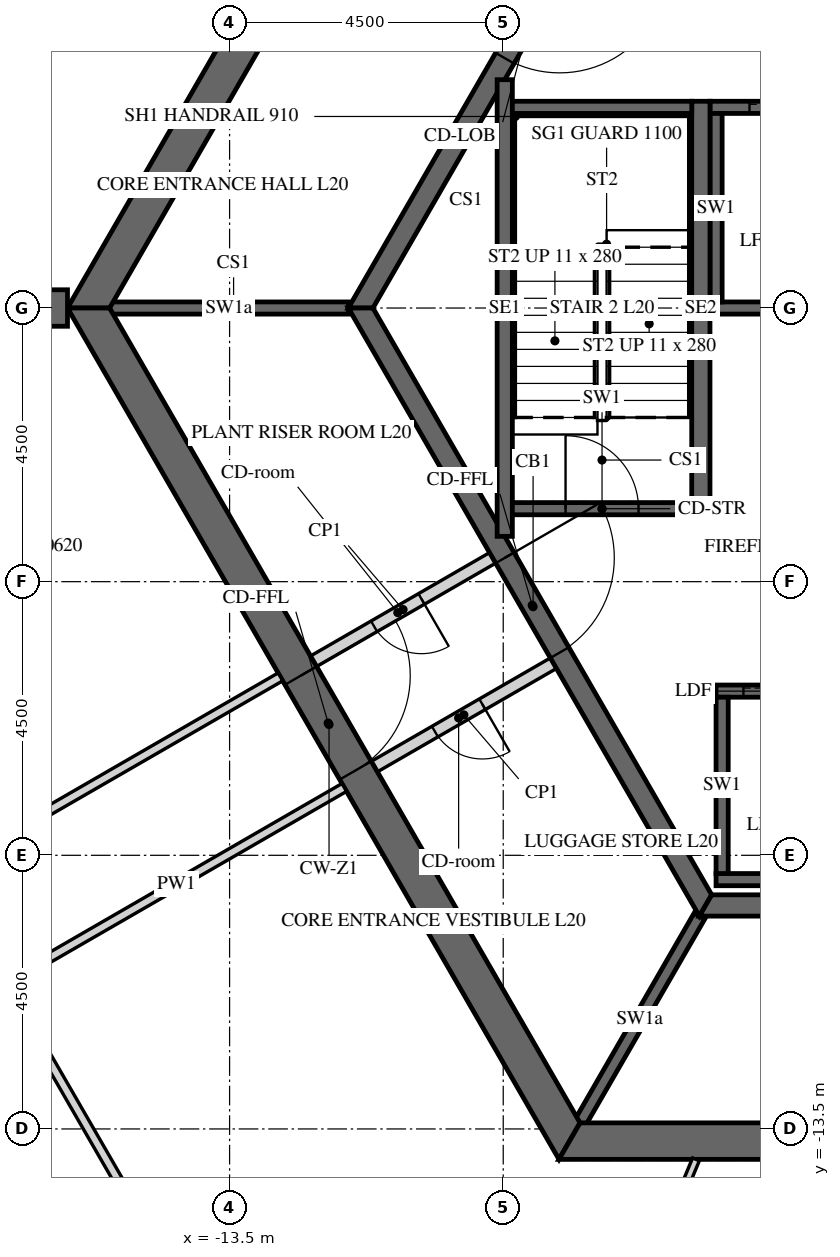
"""IFC4 building model, lengths in metres.
Left out: names, types, materials, properties, quantities, classifications, styles, units other than length and angle.
Written with IfcOpenShell. Run it as: python <this file> out.ifc"""

import sys

from ifc_helpers import new_model, si_unit, direction, frame, frame_2d, origin, place, context, subcontext, project, spatial, polyline, rectangle, outline, extrude, element, fill, save


model = new_model("IFC4")
c1 = context("Model", 3, precision=1e-05, world=origin(), true_north=direction((0.0, 1.0)))
c2 = subcontext(c1, "Body", "Model", "MODEL_VIEW")
j1 = project(units=[si_unit("LENGTHUNIT", "METRE"), si_unit("PLANEANGLEUNIT", "RADIAN")], contexts=[c1])
p1 = place(None, origin())
s1 = spatial("IfcSite", under=j1, at=p1, CompositionType="ELEMENT")
p2 = place(p1, origin())
s2 = spatial("IfcBuilding", under=s1, at=p2, CompositionType="ELEMENT")
p3 = place(p2, frame((0.0, 0.0, 92.1)))
s3 = spatial("IfcBuildingStorey", under=s2, at=p3, CompositionType="ELEMENT", Elevation=92.1)
p4 = place(p3, frame((-7.91, 13.7, -0.15), z_axis=(0.0, 0.0, 1.0), x_axis=(-0.499999880136, -0.866025472988, 0.0)))
e1 = element("IfcWall", 1, at=p4, inside=s3, PredefinedType="SHEAR", context=c2, shape_type="SweptSolid", body=[
    extrude(outline(polyline([(-0.173, -0.3), (15.993, -0.3), (15.646, 0.3), (0.173, 0.3), (-0.173, -0.3)])), origin(), (0.0, 0.0, 1.0), 3.9),
])
p5 = place(p4, frame((7.039, 0.0, 0.15)))
e2 = element("IfcOpeningElement", 2, at=p5, cuts=e1, PredefinedType="OPENING", context=c2, shape_type="SweptSolid", body=[
    extrude(rectangle(XDim=1.8, YDim=2.4, at=frame_2d((0.9, 1.2))), frame((0.0, 0.31, 0.0), z_axis=(0.0, -1.0, 0.0), x_axis=(1.0, 0.0, 0.0)), (0.0, 0.0, 1.0), 0.62),
])
p6 = place(p3, frame((-15.819, 0.0, -0.15), z_axis=(0.0, 0.0, 1.0), x_axis=(0.499999880136, -0.866025472988, 0.0)))
e3 = element("IfcWall", 3, at=p6, inside=s3, PredefinedType="SHEAR", context=c2, shape_type="SweptSolid", body=[
    extrude(outline(polyline([(-0.173, -0.3), (15.993, -0.3), (15.646, 0.3), (0.173, 0.3), (-0.173, -0.3)])), origin(), (0.0, 0.0, 1.0), 3.9),
])
p7 = place(p6, frame((6.981, 0.0, 0.15)))
e4 = element("IfcOpeningElement", 4, at=p7, cuts=e3, PredefinedType="OPENING", context=c2, shape_type="SweptSolid", body=[
    extrude(rectangle(XDim=1.8, YDim=2.4, at=frame_2d((0.9, 1.2))), frame((0.0, 0.31, 0.0), z_axis=(0.0, -1.0, 0.0), x_axis=(1.0, 0.0, 0.0)), (0.0, 0.0, 1.0), 0.62),
])
p8 = place(p3, frame((-7.91, -13.7, -0.15), z_axis=(0.0, 0.0, 1.0), x_axis=(1.0, 0.0, 0.0)))
e5 = element("IfcWall", 5, at=p8, inside=s3, PredefinedType="SHEAR", context=c2, shape_type="SweptSolid", body=[
    extrude(outline(polyline([(-0.173, -0.3), (15.993, -0.3), (15.646, 0.3), (0.173, 0.3), (-0.173, -0.3)])), origin(), (0.0, 0.0, 1.0), 3.9),
])
p9 = place(p8, frame((7.31, 0.0, 0.15)))
e6 = element("IfcOpeningElement", 6, at=p9, cuts=e5, PredefinedType="OPENING", context=c2, shape_type="SweptSolid", body=[
    extrude(rectangle(XDim=1.2, YDim=2.4, at=frame_2d((0.6, 1.2))), frame((0.0, 0.31, 0.0), z_axis=(0.0, -1.0, 0.0), x_axis=(1.0, 0.0, 0.0)), (0.0, 0.0, 1.0), 0.62),
])
p10 = place(p3, frame((-16.166, 0.0, -0.15), z_axis=(0.0, 0.0, 1.0), x_axis=(-1.0, 0.0, 0.0)))
e7 = element("IfcWall", 7, at=p10, inside=s3, PredefinedType="SHEAR", context=c2, shape_type="SweptSolid", body=[
    extrude(rectangle(XDim=16.509, YDim=0.6, at=frame_2d((8.254, 0.0))), origin(), (0.0, 0.0, 1.0), 3.9),
])
p11 = place(p10, frame((7.354, 0.0, 0.15)))
e8 = element("IfcOpeningElement", 8, at=p11, cuts=e7, PredefinedType="OPENING", context=c2, shape_type="SweptSolid", body=[
    extrude(rectangle(XDim=1.8, YDim=2.4, at=frame_2d((0.9, 1.2))), frame((0.0, 0.31, 0.0), z_axis=(0.0, -1.0, 0.0), x_axis=(1.0, 0.0, 0.0)), (0.0, 0.0, 1.0), 0.62),
])
p12 = place(p3, frame((-5.673, 9.825, -0.15), z_axis=(0.0, 0.0, 1.0), x_axis=(-0.499995046907, -0.866028263435, 0.0)))
e9 = element("IfcWall", 9, at=p12, inside=s3, PredefinedType="SHEAR", context=c2, shape_type="SweptSolid", body=[
    extrude(outline(polyline([(-0.101, -0.175), (11.446, -0.175), (11.244, 0.175), (0.101, 0.175), (-0.101, -0.175)])), origin(), (0.0, 0.0, 1.0), 3.9),
])
p13 = place(p12, frame((4.801, 0.0, 0.15)))
e10 = element("IfcOpeningElement", 10, at=p13, cuts=e9, PredefinedType="OPENING", context=c2, shape_type="SweptSolid", body=[
    extrude(rectangle(XDim=1.8, YDim=2.4, at=frame_2d((0.9, 1.2))), frame((0.0, 0.185, 0.0), z_axis=(0.0, -1.0, 0.0), x_axis=(1.0, 0.0, 0.0)), (0.0, 0.0, 1.0), 0.37),
])
p14 = place(p3, frame((-11.345, 0.0, -0.15), z_axis=(0.0, 0.0, 1.0), x_axis=(0.499995046907, -0.866028263435, 0.0)))
e11 = element("IfcWall", 11, at=p14, inside=s3, PredefinedType="SHEAR", context=c2, shape_type="SweptSolid", body=[
    extrude(outline(polyline([(-0.101, -0.175), (11.446, -0.175), (11.244, 0.175), (0.101, 0.175), (-0.101, -0.175)])), origin(), (0.0, 0.0, 1.0), 3.9),
])
p15 = place(p14, frame((4.744, 0.0, 0.15)))
e12 = element("IfcOpeningElement", 12, at=p15, cuts=e11, PredefinedType="OPENING", context=c2, shape_type="SweptSolid", body=[
    extrude(rectangle(XDim=1.8, YDim=2.4, at=frame_2d((0.9, 1.2))), frame((0.0, 0.185, 0.0), z_axis=(0.0, -1.0, 0.0), x_axis=(1.0, 0.0, 0.0)), (0.0, 0.0, 1.0), 0.37),
])
p16 = place(p3, frame((-5.673, -9.825, -0.15), z_axis=(0.0, 0.0, 1.0), x_axis=(1.0, 0.0, 0.0)))
e13 = element("IfcWall", 13, at=p16, inside=s3, PredefinedType="SHEAR", context=c2, shape_type="SweptSolid", body=[
    extrude(outline(polyline([(-0.101, -0.175), (11.446, -0.175), (11.244, 0.175), (0.101, 0.175), (-0.101, -0.175)])), origin(), (0.0, 0.0, 1.0), 3.9),
])
p17 = place(p3, frame((-5.6, 3.3, -0.25), z_axis=(0.0, 0.0, 1.0), x_axis=(1.0, 0.0, 0.0)))
e14 = element("IfcWall", 14, at=p17, inside=s3, PredefinedType="SHEAR", context=c2, shape_type="SweptSolid", body=[
    extrude(rectangle(XDim=11.2, YDim=0.2, at=frame_2d((5.6, 0.0))), origin(), (0.0, 0.0, 1.0), 3.9),
])
p18 = place(p17, frame((0.65, 0.0, 0.25)))
e15 = element("IfcOpeningElement", 15, at=p18, cuts=e14, PredefinedType="OPENING", context=c2, shape_type="SweptSolid", body=[
    extrude(rectangle(XDim=1.1, YDim=2.1, at=frame_2d((0.55, 1.05))), frame((0.0, 0.11, 0.0), z_axis=(0.0, -1.0, 0.0), x_axis=(1.0, 0.0, 0.0)), (0.0, 0.0, 1.0), 0.22),
])
p19 = place(p17, frame((2.85, 0.0, 0.25)))
e16 = element("IfcOpeningElement", 16, at=p19, cuts=e14, PredefinedType="OPENING", context=c2, shape_type="SweptSolid", body=[
    extrude(rectangle(XDim=1.1, YDim=2.1, at=frame_2d((0.55, 1.05))), frame((0.0, 0.11, 0.0), z_axis=(0.0, -1.0, 0.0), x_axis=(1.0, 0.0, 0.0)), (0.0, 0.0, 1.0), 0.22),
])
p20 = place(p17, frame((5.05, 0.0, 0.25)))
e17 = element("IfcOpeningElement", 17, at=p20, cuts=e14, PredefinedType="OPENING", context=c2, shape_type="SweptSolid", body=[
    extrude(rectangle(XDim=1.1, YDim=2.1, at=frame_2d((0.55, 1.05))), frame((0.0, 0.11, 0.0), z_axis=(0.0, -1.0, 0.0), x_axis=(1.0, 0.0, 0.0)), (0.0, 0.0, 1.0), 0.22),
])
p21 = place(p17, frame((7.25, 0.0, 0.25)))
e18 = element("IfcOpeningElement", 18, at=p21, cuts=e14, PredefinedType="OPENING", context=c2, shape_type="SweptSolid", body=[
    extrude(rectangle(XDim=1.1, YDim=2.1, at=frame_2d((0.55, 1.05))), frame((0.0, 0.11, 0.0), z_axis=(0.0, -1.0, 0.0), x_axis=(1.0, 0.0, 0.0)), (0.0, 0.0, 1.0), 0.22),
])
p22 = place(p17, frame((9.45, 0.0, 0.25)))
e19 = element("IfcOpeningElement", 19, at=p22, cuts=e14, PredefinedType="OPENING", context=c2, shape_type="SweptSolid", body=[
    extrude(rectangle(XDim=1.1, YDim=2.1, at=frame_2d((0.55, 1.05))), frame((0.0, 0.11, 0.0), z_axis=(0.0, -1.0, 0.0), x_axis=(1.0, 0.0, 0.0)), (0.0, 0.0, 1.0), 0.22),
])
p23 = place(p3, frame((-5.6, 0.0, -0.25), z_axis=(0.0, 0.0, 1.0), x_axis=(1.0, 0.0, 0.0)))
e20 = element("IfcWall", 20, at=p23, inside=s3, PredefinedType="SHEAR", context=c2, shape_type="SweptSolid", body=[
    extrude(rectangle(XDim=11.2, YDim=0.2, at=frame_2d((5.6, 0.0))), origin(), (0.0, 0.0, 1.0), 3.9),
])
p24 = place(p3, frame((-5.5, 0.1, -0.25), z_axis=(0.0, 0.0, 1.0), x_axis=(0.0, 1.0, 0.0)))
e21 = element("IfcWall", 21, at=p24, inside=s3, PredefinedType="SHEAR", context=c2, shape_type="SweptSolid", body=[
    extrude(rectangle(XDim=3.1, YDim=0.2, at=frame_2d((1.55, 0.0))), origin(), (0.0, 0.0, 1.0), 3.9),
])
p25 = place(p3, frame((-5.5, -6.3, -0.25), z_axis=(0.0, 0.0, 1.0), x_axis=(1.0, 0.0, 0.0)))
e22 = element("IfcWall", 22, at=p25, inside=s3, PredefinedType="SHEAR", context=c2, shape_type="SweptSolid", body=[
    extrude(rectangle(XDim=9.2, YDim=0.2, at=frame_2d((4.6, 0.0))), origin(), (0.0, 0.0, 1.0), 3.9),
])
p26 = place(p25, frame((0.45, 0.0, 0.25)))
e23 = element("IfcOpeningElement", 23, at=p26, cuts=e22, PredefinedType="OPENING", context=c2, shape_type="SweptSolid", body=[
    extrude(rectangle(XDim=1.1, YDim=2.1, at=frame_2d((0.55, 1.05))), frame((0.0, 0.11, 0.0), z_axis=(0.0, -1.0, 0.0), x_axis=(1.0, 0.0, 0.0)), (0.0, 0.0, 1.0), 0.22),
])
p27 = place(p25, frame((2.25, 0.0, 0.25)))
e24 = element("IfcOpeningElement", 24, at=p27, cuts=e22, PredefinedType="OPENING", context=c2, shape_type="SweptSolid", body=[
    extrude(rectangle(XDim=1.1, YDim=2.1, at=frame_2d((0.55, 1.05))), frame((0.0, 0.11, 0.0), z_axis=(0.0, -1.0, 0.0), x_axis=(1.0, 0.0, 0.0)), (0.0, 0.0, 1.0), 0.22),
])
p28 = place(p25, frame((4.05, 0.0, 0.25)))
e25 = element("IfcOpeningElement", 25, at=p28, cuts=e22, PredefinedType="OPENING", context=c2, shape_type="SweptSolid", body=[
    extrude(rectangle(XDim=1.1, YDim=2.1, at=frame_2d((0.55, 1.05))), frame((0.0, 0.11, 0.0), z_axis=(0.0, -1.0, 0.0), x_axis=(1.0, 0.0, 0.0)), (0.0, 0.0, 1.0), 0.22),
])
p29 = place(p25, frame((5.85, 0.0, 0.25)))
e26 = element("IfcOpeningElement", 26, at=p29, cuts=e22, PredefinedType="OPENING", context=c2, shape_type="SweptSolid", body=[
    extrude(rectangle(XDim=1.1, YDim=2.1, at=frame_2d((0.55, 1.05))), frame((0.0, 0.11, 0.0), z_axis=(0.0, -1.0, 0.0), x_axis=(1.0, 0.0, 0.0)), (0.0, 0.0, 1.0), 0.22),
])
p30 = place(p25, frame((7.65, 0.0, 0.25)))
e27 = element("IfcOpeningElement", 27, at=p30, cuts=e22, PredefinedType="OPENING", context=c2, shape_type="SweptSolid", body=[
    extrude(rectangle(XDim=1.1, YDim=2.1, at=frame_2d((0.55, 1.05))), frame((0.0, 0.11, 0.0), z_axis=(0.0, -1.0, 0.0), x_axis=(1.0, 0.0, 0.0)), (0.0, 0.0, 1.0), 0.22),
])
p31 = place(p3, frame((-5.5, -9.4, -0.25), z_axis=(0.0, 0.0, 1.0), x_axis=(1.0, 0.0, 0.0)))
e28 = element("IfcWall", 28, at=p31, inside=s3, PredefinedType="SHEAR", context=c2, shape_type="SweptSolid", body=[
    extrude(rectangle(XDim=9.2, YDim=0.2, at=frame_2d((4.6, 0.0))), origin(), (0.0, 0.0, 1.0), 3.9),
])
p32 = place(p3, frame((-5.4, -9.3, -0.25), z_axis=(0.0, 0.0, 1.0), x_axis=(0.0, 1.0, 0.0)))
e29 = element("IfcWall", 29, at=p32, inside=s3, PredefinedType="SHEAR", context=c2, shape_type="SweptSolid", body=[
    extrude(rectangle(XDim=2.9, YDim=0.2, at=frame_2d((1.45, 0.0))), origin(), (0.0, 0.0, 1.0), 3.9),
])
p33 = place(p3, frame((-11.547, 0.0, -0.15), z_axis=(0.0, 0.0, 1.0), x_axis=(-1.0, 0.0, 0.0)))
e30 = element("IfcWall", 30, at=p33, inside=s3, PredefinedType="SHEAR", context=c2, shape_type="SweptSolid", body=[
    extrude(rectangle(XDim=3.926, YDim=0.2, at=frame_2d((1.963, 0.0))), origin(), (0.0, 0.0, 1.0), 3.9),
])
p34 = place(p3, frame((-5.773, -10.0, -0.15), z_axis=(0.0, 0.0, 1.0), x_axis=(-0.500038251005, -0.86600331843, 0.0)))
e31 = element("IfcWall", 31, at=p34, inside=s3, PredefinedType="SHEAR", context=c2, shape_type="SweptSolid", body=[
    extrude(rectangle(XDim=3.926, YDim=0.2, at=frame_2d((1.963, 0.0))), origin(), (0.0, 0.0, 1.0), 3.9),
])
p35 = place(p3, frame((-8.175, -5.841, 0.0), z_axis=(0.0, 0.0, 1.0), x_axis=(-0.866020560687, -0.500008388397, 0.0)))
e32 = element("IfcWall", 32, at=p35, inside=s3, PredefinedType="PARTITIONING", context=c2, shape_type="SweptSolid", body=[
    extrude(rectangle(XDim=3.4, YDim=0.2, at=frame_2d((1.7, 0.0))), origin(), (0.0, 0.0, 1.0), 3.65),
])
p36 = place(p35, frame((1.35, 0.0, 0.0)))
e33 = element("IfcOpeningElement", 33, at=p36, cuts=e32, PredefinedType="OPENING", context=c2, shape_type="SweptSolid", body=[
    extrude(rectangle(XDim=0.9, YDim=2.1, at=frame_2d((0.45, 1.05))), frame((0.0, 0.11, 0.0), z_axis=(0.0, -1.0, 0.0), x_axis=(1.0, 0.0, 0.0)), (0.0, 0.0, 1.0), 0.22),
])
p37 = place(p3, frame((-9.175, -4.109, 0.0), z_axis=(0.0, 0.0, 1.0), x_axis=(-0.865989465428, -0.500062241894, 0.0)))
e34 = element("IfcWall", 34, at=p37, inside=s3, PredefinedType="PARTITIONING", context=c2, shape_type="SweptSolid", body=[
    extrude(rectangle(XDim=3.4, YDim=0.2, at=frame_2d((1.7, 0.0))), origin(), (0.0, 0.0, 1.0), 3.65),
])
p38 = place(p37, frame((1.351, 0.0, 0.0)))
e35 = element("IfcOpeningElement", 35, at=p38, cuts=e34, PredefinedType="OPENING", context=c2, shape_type="SweptSolid", body=[
    extrude(rectangle(XDim=0.9, YDim=2.1, at=frame_2d((0.45, 1.05))), frame((0.0, 0.11, 0.0), z_axis=(0.0, -1.0, 0.0), x_axis=(1.0, 0.0, 0.0)), (0.0, 0.0, 1.0), 0.22),
])
p39 = place(p3, frame((-5.75, -3.4, -0.25), z_axis=(0.0, 0.0, 1.0), x_axis=(0.0, 1.0, 0.0)))
e36 = element("IfcWall", 36, at=p39, inside=s3, PredefinedType="SHEAR", context=c2, shape_type="SweptSolid", body=[
    extrude(rectangle(XDim=6.8, YDim=0.3, at=frame_2d((3.4, 0.0))), origin(), (0.0, 0.0, 1.0), 3.9),
])
p40 = place(p3, frame((-8.975, -3.755, -0.25), z_axis=(0.0, 0.0, 1.0), x_axis=(0.0, 1.0, 0.0)))
e37 = element("IfcWall", 37, at=p40, inside=s3, PredefinedType="SHEAR", context=c2, shape_type="SweptSolid", body=[
    extrude(rectangle(XDim=7.51, YDim=0.25, at=frame_2d((3.755, 0.0))), origin(), (0.0, 0.0, 1.0), 3.9),
])
p41 = place(p3, frame((-8.85, 3.3, -0.25), z_axis=(0.0, 0.0, 1.0), x_axis=(1.0, 0.0, 0.0)))
e38 = element("IfcWall", 38, at=p41, inside=s3, PredefinedType="SHEAR", context=c2, shape_type="SweptSolid", body=[
    extrude(rectangle(XDim=2.95, YDim=0.2, at=frame_2d((1.475, 0.0))), origin(), (0.0, 0.0, 1.0), 3.9),
])
p42 = place(p3, frame((-8.85, -3.3, -0.25), z_axis=(0.0, 0.0, 1.0), x_axis=(1.0, 0.0, 0.0)))
e39 = element("IfcWall", 39, at=p42, inside=s3, PredefinedType="SHEAR", context=c2, shape_type="SweptSolid", body=[
    extrude(rectangle(XDim=2.95, YDim=0.2, at=frame_2d((1.475, 0.0))), origin(), (0.0, 0.0, 1.0), 3.9),
])
p43 = place(p42, frame((0.875, 0.0, 0.25)))
e40 = element("IfcOpeningElement", 40, at=p43, cuts=e39, PredefinedType="OPENING", context=c2, shape_type="SweptSolid", body=[
    extrude(rectangle(XDim=1.2, YDim=2.4, at=frame_2d((0.6, 1.2))), frame((0.0, 0.11, 0.0), z_axis=(0.0, -1.0, 0.0), x_axis=(1.0, 0.0, 0.0)), (0.0, 0.0, 1.0), 0.22),
])
p44 = place(p3, frame((-13.94, 22.175, 0.0), z_axis=(0.0, 0.0, 1.0), x_axis=(-0.438373022655, -0.898793131376, 0.0)))
e41 = element("IfcWall", 41, at=p44, inside=s3, PredefinedType="PARTITIONING", context=c2, shape_type="SweptSolid", body=[
    extrude(rectangle(XDim=22.335, YDim=0.15, at=frame_2d((11.168, 0.0))), origin(), (0.0, 0.0, 1.0), 2.988),
])
p45 = place(p44, frame((0.559, 0.0, 0.0)))
e42 = element("IfcOpeningElement", 42, at=p45, cuts=e41, PredefinedType="OPENING", context=c2, shape_type="SweptSolid", body=[
    extrude(rectangle(XDim=1.0, YDim=2.1, at=frame_2d((0.5, 1.05))), frame((0.0, 0.085, 0.0), z_axis=(0.0, -1.0, 0.0), x_axis=(1.0, 0.0, 0.0)), (0.0, 0.0, 1.0), 0.17),
])
p46 = place(p44, frame((7.209, 0.0, 0.0)))
e43 = element("IfcOpeningElement", 43, at=p46, cuts=e41, PredefinedType="OPENING", context=c2, shape_type="SweptSolid", body=[
    extrude(rectangle(XDim=1.0, YDim=2.1, at=frame_2d((0.5, 1.05))), frame((0.0, 0.085, 0.0), z_axis=(0.0, -1.0, 0.0), x_axis=(1.0, 0.0, 0.0)), (0.0, 0.0, 1.0), 0.17),
])
p47 = place(p44, frame((20.072, 0.0, 0.0)))
e44 = element("IfcOpeningElement", 44, at=p47, cuts=e41, PredefinedType="OPENING", context=c2, shape_type="SweptSolid", body=[
    extrude(rectangle(XDim=1.0, YDim=2.1, at=frame_2d((0.5, 1.05))), frame((0.0, 0.085, 0.0), z_axis=(0.0, -1.0, 0.0), x_axis=(1.0, 0.0, 0.0)), (0.0, 0.0, 1.0), 0.17),
])
p48 = place(p3, frame((-24.436, -2.175, 0.0), z_axis=(0.0, 0.0, 1.0), x_axis=(0.499996816197, -0.866027241946, 0.0)))
e45 = element("IfcWall", 45, at=p48, inside=s3, PredefinedType="PARTITIONING", context=c2, shape_type="SweptSolid", body=[
    extrude(rectangle(XDim=24.238, YDim=0.15, at=frame_2d((12.119, 0.0))), origin(), (0.0, 0.0, 1.0), 2.988),
])
p49 = place(p48, frame((0.429, 0.0, 0.0)))
e46 = element("IfcOpeningElement", 46, at=p49, cuts=e45, PredefinedType="OPENING", context=c2, shape_type="SweptSolid", body=[
    extrude(rectangle(XDim=1.0, YDim=2.1, at=frame_2d((0.5, 1.05))), frame((0.0, 0.085, 0.0), z_axis=(0.0, -1.0, 0.0), x_axis=(1.0, 0.0, 0.0)), (0.0, 0.0, 1.0), 0.17),
])
p50 = place(p48, frame((12.346, 0.0, 0.0)))
e47 = element("IfcOpeningElement", 47, at=p50, cuts=e45, PredefinedType="OPENING", context=c2, shape_type="SweptSolid", body=[
    extrude(rectangle(XDim=1.0, YDim=2.1, at=frame_2d((0.5, 1.05))), frame((0.0, 0.085, 0.0), z_axis=(0.0, -1.0, 0.0), x_axis=(1.0, 0.0, 0.0)), (0.0, 0.0, 1.0), 0.17),
])
p51 = place(p48, frame((22.292, 0.0, 0.0)))
e48 = element("IfcOpeningElement", 48, at=p51, cuts=e45, PredefinedType="OPENING", context=c2, shape_type="SweptSolid", body=[
    extrude(rectangle(XDim=1.0, YDim=2.1, at=frame_2d((0.5, 1.05))), frame((0.0, 0.085, 0.0), z_axis=(0.0, -1.0, 0.0), x_axis=(1.0, 0.0, 0.0)), (0.0, 0.0, 1.0), 0.17),
])
p52 = place(p3, frame((-12.664, -6.066, 0.0), z_axis=(0.0, 0.0, 1.0), x_axis=(-0.866021702275, -0.500006411147, 0.0)))
e49 = element("IfcWall", 49, at=p52, inside=s3, PredefinedType="PARTITIONING", context=c2, shape_type="SweptSolid", body=[
    extrude(rectangle(XDim=6.45, YDim=0.15, at=frame_2d((3.225, 0.0))), origin(), (0.0, 0.0, 1.0), 2.988),
])
p53 = place(p3, frame((-11.363, -21.219, 0.0), z_axis=(0.0, 0.0, 1.0), x_axis=(-0.50001451402, 0.866017023949, 0.0)))
e50 = element("IfcWall", 50, at=p53, inside=s3, PredefinedType="PARTITIONING", context=c2, shape_type="SweptSolid", body=[
    extrude(rectangle(XDim=11.674, YDim=0.15, at=frame_2d((5.837, 0.0))), origin(), (0.0, 0.0, 1.0), 2.988),
])
p54 = place(p53, frame((5.387, 0.0, 0.0)))
e51 = element("IfcOpeningElement", 51, at=p54, cuts=e50, PredefinedType="OPENING", context=c2, shape_type="SweptSolid", body=[
    extrude(rectangle(XDim=0.9, YDim=2.1, at=frame_2d((0.45, 1.05))), frame((0.0, 0.085, 0.0), z_axis=(0.0, -1.0, 0.0), x_axis=(1.0, 0.0, 0.0)), (0.0, 0.0, 1.0), 0.17),
])
p55 = place(p3, frame((-17.135, -11.072, 0.0), z_axis=(0.0, 0.0, 1.0), x_axis=(0.866028703517, 0.499994284652, 0.0)))
e52 = element("IfcWall", 52, at=p55, inside=s3, PredefinedType="PARTITIONING", context=c2, shape_type="SweptSolid", body=[
    extrude(rectangle(XDim=6.375, YDim=0.15, at=frame_2d((3.188, 0.0))), origin(), (0.0, 0.0, 1.0), 2.988),
])
p56 = place(p3, frame((-5.83, -14.0, 0.0), z_axis=(0.0, 0.0, 1.0), x_axis=(-0.384440276883, -0.923149865141, 0.0)))
e53 = element("IfcWall", 53, at=p56, inside=s3, PredefinedType="PARTITIONING", context=c2, shape_type="SweptSolid", body=[
    extrude(rectangle(XDim=7.623, YDim=0.12, at=frame_2d((3.812, 0.0))), origin(), (0.0, 0.0, 1.0), 2.988),
])
p57 = place(p7, origin())
e54 = element("IfcDoor", 54, at=p57, inside=s3, OperationType="DOUBLE_DOOR_SINGLE_SWING", PredefinedType="DOOR", context=c2, shape_type="SweptSolid", body=[
    extrude(rectangle(XDim=1.8, YDim=2.4, at=frame_2d((0.9, 1.2))), frame((0.0, 0.025, 0.0), z_axis=(0.0, -1.0, 0.0), x_axis=(1.0, 0.0, 0.0)), (0.0, 0.0, 1.0), 0.05),
])
fill(e4, e54)
p58 = place(p13, origin())
e55 = element("IfcDoor", 55, at=p58, inside=s3, OperationType="DOUBLE_DOOR_SINGLE_SWING", PredefinedType="DOOR", context=c2, shape_type="SweptSolid", body=[
    extrude(rectangle(XDim=1.8, YDim=2.4, at=frame_2d((0.9, 1.2))), frame((0.0, 0.025, 0.0), z_axis=(0.0, -1.0, 0.0), x_axis=(1.0, 0.0, 0.0)), (0.0, 0.0, 1.0), 0.05),
])
fill(e10, e55)
p59 = place(p15, origin())
e56 = element("IfcDoor", 56, at=p59, inside=s3, OperationType="DOUBLE_DOOR_SINGLE_SWING", PredefinedType="DOOR", context=c2, shape_type="SweptSolid", body=[
    extrude(rectangle(XDim=1.8, YDim=2.4, at=frame_2d((0.9, 1.2))), frame((0.0, 0.025, 0.0), z_axis=(0.0, -1.0, 0.0), x_axis=(1.0, 0.0, 0.0)), (0.0, 0.0, 1.0), 0.05),
])
fill(e12, e56)
p60 = place(p36, origin())
e57 = element("IfcDoor", 57, at=p60, inside=s3, OperationType="SINGLE_SWING_LEFT", PredefinedType="DOOR", context=c2, shape_type="SweptSolid", body=[
    extrude(rectangle(XDim=0.9, YDim=2.1, at=frame_2d((0.45, 1.05))), frame((0.0, 0.025, 0.0), z_axis=(0.0, -1.0, 0.0), x_axis=(1.0, 0.0, 0.0)), (0.0, 0.0, 1.0), 0.05),
])
fill(e33, e57)
p61 = place(p38, origin())
e58 = element("IfcDoor", 58, at=p61, inside=s3, OperationType="SINGLE_SWING_LEFT", PredefinedType="DOOR", context=c2, shape_type="SweptSolid", body=[
    extrude(rectangle(XDim=0.9, YDim=2.1, at=frame_2d((0.45, 1.05))), frame((0.0, 0.025, 0.0), z_axis=(0.0, -1.0, 0.0), x_axis=(1.0, 0.0, 0.0)), (0.0, 0.0, 1.0), 0.05),
])
fill(e35, e58)
p62 = place(p43, origin())
e59 = element("IfcDoor", 59, at=p62, inside=s3, OperationType="SINGLE_SWING_LEFT", PredefinedType="DOOR", context=c2, shape_type="SweptSolid", body=[
    extrude(rectangle(XDim=1.2, YDim=2.4, at=frame_2d((0.6, 1.2))), frame((0.0, 0.025, 0.0), z_axis=(0.0, -1.0, 0.0), x_axis=(1.0, 0.0, 0.0)), (0.0, 0.0, 1.0), 0.05),
])
fill(e40, e59)
p63 = place(p18, origin())
e60 = element("IfcDoor", 60, at=p63, inside=s3, OperationType="SLIDING_TO_LEFT", PredefinedType="DOOR", context=c2, shape_type="SweptSolid", body=[
    extrude(rectangle(XDim=1.1, YDim=2.1, at=frame_2d((0.55, 1.05))), frame((0.0, 0.025, 0.0), z_axis=(0.0, -1.0, 0.0), x_axis=(1.0, 0.0, 0.0)), (0.0, 0.0, 1.0), 0.05),
])
fill(e15, e60)
p64 = place(p26, origin())
e61 = element("IfcDoor", 61, at=p64, inside=s3, OperationType="SLIDING_TO_LEFT", PredefinedType="DOOR", context=c2, shape_type="SweptSolid", body=[
    extrude(rectangle(XDim=1.1, YDim=2.1, at=frame_2d((0.55, 1.05))), frame((0.0, 0.025, 0.0), z_axis=(0.0, -1.0, 0.0), x_axis=(1.0, 0.0, 0.0)), (0.0, 0.0, 1.0), 0.05),
])
fill(e23, e61)
save(model, sys.argv[1])
